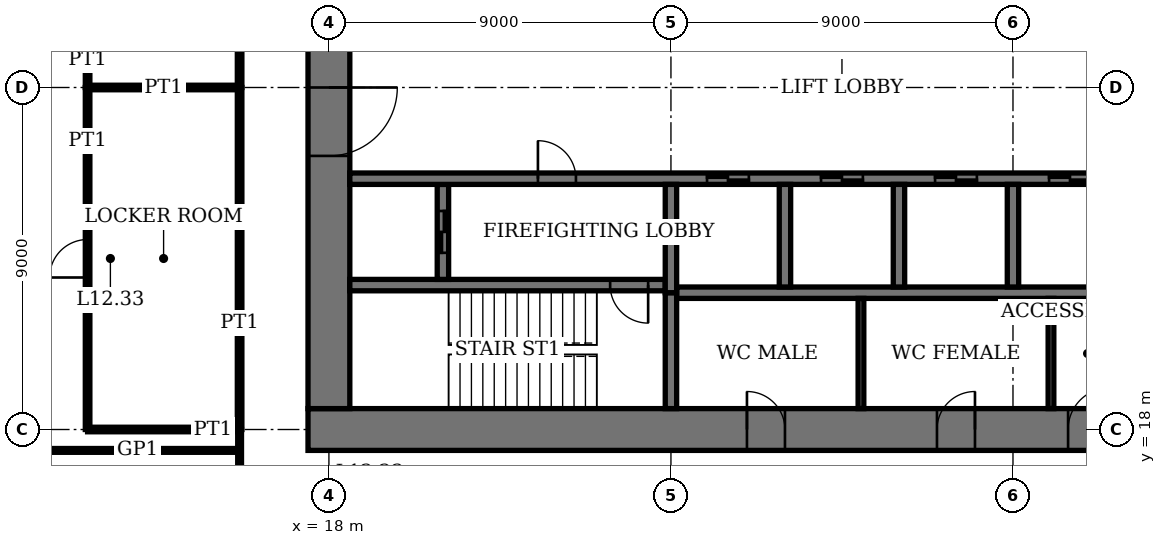
"""IFC4 building model, lengths in metres.
Left out: names, types, materials, properties, quantities, classifications, styles, units other than length and angle.
Written with IfcOpenShell. Run it as: python <this file> out.ifc"""

import sys

from ifc_helpers import new_model, si_unit, direction, frame, frame_2d, origin, place, context, subcontext, project, spatial, rectangle, extrude, element, fill, save


model = new_model("IFC4")
c1 = context("Model", 3, precision=1e-05, world=origin(), true_north=direction((0.0, 1.0)))
c2 = subcontext(c1, "Body", "Model", "MODEL_VIEW")
j1 = project(units=[si_unit("LENGTHUNIT", "METRE"), si_unit("PLANEANGLEUNIT", "RADIAN")], contexts=[c1])
p1 = place(None, origin())
s1 = spatial("IfcSite", under=j1, at=p1, CompositionType="ELEMENT")
p2 = place(p1, origin())
s2 = spatial("IfcBuilding", under=s1, at=p2, CompositionType="ELEMENT")
p3 = place(p2, frame((0.0, 0.0, 51.8)))
s3 = spatial("IfcBuildingStorey", under=s2, at=p3, CompositionType="ELEMENT", Elevation=51.8)
p4 = place(p3, frame((17.45, 18.0, 0.0), z_axis=(0.0, 0.0, 1.0), x_axis=(1.0, 0.0, 0.0)))
e1 = element("IfcWall", 1, at=p4, inside=s3, PredefinedType="SHEAR", context=c2, shape_type="SweptSolid", body=[
    extrude(rectangle(XDim=28.1, YDim=1.1, at=frame_2d((14.05, 0.0))), origin(), (0.0, 0.0, 1.0), 4.0),
])
p5 = place(p4, frame((11.55, 0.0, 0.0)))
e2 = element("IfcOpeningElement", 2, at=p5, cuts=e1, PredefinedType="OPENING", context=c2, shape_type="SweptSolid", body=[
    extrude(rectangle(XDim=1.0, YDim=2.4, at=frame_2d((0.5, 1.2))), frame((0.0, 0.56, 0.0), z_axis=(0.0, -1.0, 0.0), x_axis=(1.0, 0.0, 0.0)), (0.0, 0.0, 1.0), 1.12),
])
p6 = place(p4, frame((16.55, 0.0, 0.0)))
e3 = element("IfcOpeningElement", 3, at=p6, cuts=e1, PredefinedType="OPENING", context=c2, shape_type="SweptSolid", body=[
    extrude(rectangle(XDim=1.0, YDim=2.4, at=frame_2d((0.5, 1.2))), frame((0.0, 0.56, 0.0), z_axis=(0.0, -1.0, 0.0), x_axis=(1.0, 0.0, 0.0)), (0.0, 0.0, 1.0), 1.12),
])
p7 = place(p4, frame((20.0, 0.0, 0.0)))
e4 = element("IfcOpeningElement", 4, at=p7, cuts=e1, PredefinedType="OPENING", context=c2, shape_type="SweptSolid", body=[
    extrude(rectangle(XDim=1.1, YDim=2.4, at=frame_2d((0.55, 1.2))), frame((0.0, 0.56, 0.0), z_axis=(0.0, -1.0, 0.0), x_axis=(1.0, 0.0, 0.0)), (0.0, 0.0, 1.0), 1.12),
])
p8 = place(p4, frame((24.05, 0.0, 0.0)))
e5 = element("IfcOpeningElement", 5, at=p8, cuts=e1, PredefinedType="OPENING", context=c2, shape_type="SweptSolid", body=[
    extrude(rectangle(XDim=1.0, YDim=2.4, at=frame_2d((0.5, 1.2))), frame((0.0, 0.56, 0.0), z_axis=(0.0, -1.0, 0.0), x_axis=(1.0, 0.0, 0.0)), (0.0, 0.0, 1.0), 1.12),
])
p9 = place(p3, frame((18.0, 35.45, 0.0), z_axis=(0.0, 0.0, 1.0), x_axis=(0.0, -1.0, 0.0)))
e6 = element("IfcWall", 6, at=p9, inside=s3, PredefinedType="SHEAR", context=c2, shape_type="SweptSolid", body=[
    extrude(rectangle(XDim=16.9, YDim=1.1, at=frame_2d((8.45, 0.0))), origin(), (0.0, 0.0, 1.0), 4.0),
])
p10 = place(p9, frame((8.45, 0.0, 0.0)))
e7 = element("IfcOpeningElement", 7, at=p10, cuts=e6, PredefinedType="OPENING", context=c2, shape_type="SweptSolid", body=[
    extrude(rectangle(XDim=1.8, YDim=2.4, at=frame_2d((0.9, 1.2))), frame((0.0, 0.56, 0.0), z_axis=(0.0, -1.0, 0.0), x_axis=(1.0, 0.0, 0.0)), (0.0, 0.0, 1.0), 1.12),
])
p11 = place(p3, frame((18.55, 21.8, 0.0), z_axis=(0.0, 0.0, 1.0), x_axis=(1.0, 0.0, 0.0)))
e8 = element("IfcWall", 8, at=p11, inside=s3, PredefinedType="SHEAR", context=c2, shape_type="SweptSolid", body=[
    extrude(rectangle(XDim=8.3, YDim=0.3, at=frame_2d((4.15, 0.0))), origin(), (0.0, 0.0, 1.0), 4.0),
])
p12 = place(p11, frame((6.85, 0.0, 0.0)))
e9 = element("IfcOpeningElement", 9, at=p12, cuts=e8, PredefinedType="OPENING", context=c2, shape_type="SweptSolid", body=[
    extrude(rectangle(XDim=1.0, YDim=2.4, at=frame_2d((0.5, 1.2))), frame((0.0, 0.16, 0.0), z_axis=(0.0, -1.0, 0.0), x_axis=(1.0, 0.0, 0.0)), (0.0, 0.0, 1.0), 0.32),
])
p13 = place(p3, frame((27.0, 18.55, 0.0), z_axis=(0.0, 0.0, 1.0), x_axis=(0.0, 1.0, 0.0)))
e10 = element("IfcWall", 10, at=p13, inside=s3, PredefinedType="SHEAR", context=c2, shape_type="SweptSolid", body=[
    extrude(rectangle(XDim=3.05, YDim=0.3, at=frame_2d((1.525, 0.0))), origin(), (0.0, 0.0, 1.0), 4.0),
])
p14 = place(p3, frame((21.0, 21.95, 0.0), z_axis=(0.0, 0.0, 1.0), x_axis=(0.0, 1.0, 0.0)))
e11 = element("IfcWall", 11, at=p14, inside=s3, PredefinedType="SHEAR", context=c2, shape_type="SweptSolid", body=[
    extrude(rectangle(XDim=2.5, YDim=0.3, at=frame_2d((1.25, 0.0))), origin(), (0.0, 0.0, 1.0), 4.0),
])
p15 = place(p14, frame((0.7, 0.0, 0.0)))
e12 = element("IfcOpeningElement", 12, at=p15, cuts=e11, PredefinedType="OPENING", context=c2, shape_type="SweptSolid", body=[
    extrude(rectangle(XDim=1.1, YDim=2.4, at=frame_2d((0.55, 1.2))), frame((0.0, 0.16, 0.0), z_axis=(0.0, -1.0, 0.0), x_axis=(1.0, 0.0, 0.0)), (0.0, 0.0, 1.0), 0.32),
])
p16 = place(p3, frame((18.55, 24.6, 0.0), z_axis=(0.0, 0.0, 1.0), x_axis=(1.0, 0.0, 0.0)))
e13 = element("IfcWall", 13, at=p16, inside=s3, PredefinedType="SHEAR", context=c2, shape_type="SweptSolid", body=[
    extrude(rectangle(XDim=25.9, YDim=0.3, at=frame_2d((12.95, 0.0))), origin(), (0.0, 0.0, 1.0), 4.0),
])
p17 = place(p16, frame((4.95, 0.0, 0.0)))
e14 = element("IfcOpeningElement", 14, at=p17, cuts=e13, PredefinedType="OPENING", context=c2, shape_type="SweptSolid", body=[
    extrude(rectangle(XDim=1.0, YDim=2.4, at=frame_2d((0.5, 1.2))), frame((0.0, 0.16, 0.0), z_axis=(0.0, -1.0, 0.0), x_axis=(1.0, 0.0, 0.0)), (0.0, 0.0, 1.0), 0.32),
])
p18 = place(p16, frame((24.5, 0.0, 0.0)))
e15 = element("IfcOpeningElement", 15, at=p18, cuts=e13, PredefinedType="OPENING", context=c2, shape_type="SweptSolid", body=[
    extrude(rectangle(XDim=0.9, YDim=2.1, at=frame_2d((0.45, 1.05))), frame((0.0, 0.16, 0.0), z_axis=(0.0, -1.0, 0.0), x_axis=(1.0, 0.0, 0.0)), (0.0, 0.0, 1.0), 0.32),
])
p19 = place(p16, frame((9.4, 0.0, 0.0)))
e16 = element("IfcOpeningElement", 16, at=p19, cuts=e13, PredefinedType="OPENING", context=c2, shape_type="SweptSolid", body=[
    extrude(rectangle(XDim=1.1, YDim=2.4, at=frame_2d((0.55, 1.2))), frame((0.0, 0.16, 0.0), z_axis=(0.0, -1.0, 0.0), x_axis=(1.0, 0.0, 0.0)), (0.0, 0.0, 1.0), 0.32),
])
p20 = place(p16, frame((12.4, 0.0, 0.0)))
e17 = element("IfcOpeningElement", 17, at=p20, cuts=e13, PredefinedType="OPENING", context=c2, shape_type="SweptSolid", body=[
    extrude(rectangle(XDim=1.1, YDim=2.4, at=frame_2d((0.55, 1.2))), frame((0.0, 0.16, 0.0), z_axis=(0.0, -1.0, 0.0), x_axis=(1.0, 0.0, 0.0)), (0.0, 0.0, 1.0), 0.32),
])
p21 = place(p16, frame((15.4, 0.0, 0.0)))
e18 = element("IfcOpeningElement", 18, at=p21, cuts=e13, PredefinedType="OPENING", context=c2, shape_type="SweptSolid", body=[
    extrude(rectangle(XDim=1.1, YDim=2.4, at=frame_2d((0.55, 1.2))), frame((0.0, 0.16, 0.0), z_axis=(0.0, -1.0, 0.0), x_axis=(1.0, 0.0, 0.0)), (0.0, 0.0, 1.0), 0.32),
])
p22 = place(p16, frame((18.4, 0.0, 0.0)))
e19 = element("IfcOpeningElement", 19, at=p22, cuts=e13, PredefinedType="OPENING", context=c2, shape_type="SweptSolid", body=[
    extrude(rectangle(XDim=1.1, YDim=2.4, at=frame_2d((0.55, 1.2))), frame((0.0, 0.16, 0.0), z_axis=(0.0, -1.0, 0.0), x_axis=(1.0, 0.0, 0.0)), (0.0, 0.0, 1.0), 0.32),
])
p23 = place(p16, frame((21.3, 0.0, 0.0)))
e20 = element("IfcOpeningElement", 20, at=p23, cuts=e13, PredefinedType="OPENING", context=c2, shape_type="SweptSolid", body=[
    extrude(rectangle(XDim=1.3, YDim=2.4, at=frame_2d((0.65, 1.2))), frame((0.0, 0.16, 0.0), z_axis=(0.0, -1.0, 0.0), x_axis=(1.0, 0.0, 0.0)), (0.0, 0.0, 1.0), 0.32),
])
p24 = place(p3, frame((27.15, 21.6, 0.0), z_axis=(0.0, 0.0, 1.0), x_axis=(1.0, 0.0, 0.0)))
e21 = element("IfcWall", 21, at=p24, inside=s3, PredefinedType="SHEAR", context=c2, shape_type="SweptSolid", body=[
    extrude(rectangle(XDim=17.3, YDim=0.3, at=frame_2d((8.65, 0.0))), origin(), (0.0, 0.0, 1.0), 4.0),
])
for number, where, z_axis, x_axis in (
    (22, (30.0, 21.75, 0.0), (0.0, 0.0, 1.0), (0.0, 1.0, 0.0)),
    (23, (33.0, 21.75, 0.0), (0.0, 0.0, 1.0), (0.0, 1.0, 0.0)),
    (24, (36.0, 21.75, 0.0), (0.0, 0.0, 1.0), (0.0, 1.0, 0.0)),
):
    element("IfcWall", number, at=place(p3, frame(where, z_axis=z_axis, x_axis=x_axis)), inside=s3, PredefinedType="SHEAR", context=c2, shape_type="SweptSolid", body=[
        extrude(rectangle(XDim=2.7, YDim=0.3, at=frame_2d((1.35, 0.0))), origin(), (0.0, 0.0, 1.0), 4.0),
    ])
p25 = place(p3, frame((27.0, 21.6, 0.0), z_axis=(0.0, 0.0, 1.0), x_axis=(0.0, 1.0, 0.0)))
e25 = element("IfcWall", 25, at=p25, inside=s3, PredefinedType="SHEAR", context=c2, shape_type="SweptSolid", body=[
    extrude(rectangle(XDim=2.85, YDim=0.3, at=frame_2d((1.425, 0.0))), origin(), (0.0, 0.0, 1.0), 4.0),
])
p26 = place(p3, frame((10.075, 17.45, 0.0), z_axis=(0.0, 0.0, 1.0), x_axis=(1.0, 0.0, 0.0)))
e26 = element("IfcWall", 26, at=p26, inside=s3, PredefinedType="PARTITIONING", context=c2, shape_type="SweptSolid", body=[
    extrude(rectangle(XDim=5.575, YDim=0.1, at=frame_2d((2.788, 0.0))), origin(), (0.0, 0.0, 1.0), 3.75),
])
for number, where, z_axis, x_axis in (
    (27, (11.65, 18.0, 0.0), (0.0, 0.0, 1.0), (1.0, 0.0, 0.0)),
    (28, (11.65, 27.0, 0.0), (0.0, 0.0, 1.0), (1.0, 0.0, 0.0)),
):
    element("IfcWall", number, at=place(p3, frame(where, z_axis=z_axis, x_axis=x_axis)), inside=s3, PredefinedType="PARTITIONING", context=c2, shape_type="SweptSolid", body=[
        extrude(rectangle(XDim=4.0, YDim=0.12, at=frame_2d((2.0, 0.0))), origin(), (0.0, 0.0, 1.0), 3.05),
    ])
p27 = place(p3, frame((11.65, 18.0, 0.0), z_axis=(0.0, 0.0, 1.0), x_axis=(0.0, 1.0, 0.0)))
e29 = element("IfcWall", 29, at=p27, inside=s3, PredefinedType="PARTITIONING", context=c2, shape_type="SweptSolid", body=[
    extrude(rectangle(XDim=9.0, YDim=0.12, at=frame_2d((4.5, 0.0))), origin(), (0.0, 0.0, 1.0), 3.75),
])
p28 = place(p27, frame((4.0, 0.0, 0.0)))
e30 = element("IfcOpeningElement", 30, at=p28, cuts=e29, PredefinedType="OPENING", context=c2, shape_type="SweptSolid", body=[
    extrude(rectangle(XDim=1.0, YDim=2.4, at=frame_2d((0.5, 1.2))), frame((0.0, 0.07, 0.0), z_axis=(0.0, -1.0, 0.0), x_axis=(1.0, 0.0, 0.0)), (0.0, 0.0, 1.0), 0.14),
])
p29 = place(p3, frame((11.65, 27.0, 0.0), z_axis=(0.0, 0.0, 1.0), x_axis=(0.0, 1.0, 0.0)))
e31 = element("IfcWall", 31, at=p29, inside=s3, PredefinedType="PARTITIONING", context=c2, shape_type="SweptSolid", body=[
    extrude(rectangle(XDim=4.5, YDim=0.12, at=frame_2d((2.25, 0.0))), origin(), (0.0, 0.0, 1.0), 3.75),
])
p30 = place(p29, frame((1.75, 0.0, 0.0)))
e32 = element("IfcOpeningElement", 32, at=p30, cuts=e31, PredefinedType="OPENING", context=c2, shape_type="SweptSolid", body=[
    extrude(rectangle(XDim=1.0, YDim=2.4, at=frame_2d((0.5, 1.2))), frame((0.0, 0.07, 0.0), z_axis=(0.0, -1.0, 0.0), x_axis=(1.0, 0.0, 0.0)), (0.0, 0.0, 1.0), 0.14),
])
p31 = place(p3, frame((15.65, 18.0, 0.0), z_axis=(0.0, 0.0, 1.0), x_axis=(0.0, 1.0, 0.0)))
e33 = element("IfcWall", 33, at=p31, inside=s3, PredefinedType="PARTITIONING", context=c2, shape_type="SweptSolid", body=[
    extrude(rectangle(XDim=9.0, YDim=0.12, at=frame_2d((4.5, 0.0))), origin(), (0.0, 0.0, 1.0), 3.75),
])
p32 = place(p3, frame((15.65, 27.0, 0.0), z_axis=(0.0, 0.0, 1.0), x_axis=(0.0, 1.0, 0.0)))
e34 = element("IfcWall", 34, at=p32, inside=s3, PredefinedType="PARTITIONING", context=c2, shape_type="SweptSolid", body=[
    extrude(rectangle(XDim=4.5, YDim=0.12, at=frame_2d((2.25, 0.0))), origin(), (0.0, 0.0, 1.0), 3.75),
])
p33 = place(p3, frame((15.65, 15.65, 0.0), z_axis=(0.0, 0.0, 1.0), x_axis=(0.0, 1.0, 0.0)))
e35 = element("IfcWall", 35, at=p33, inside=s3, PredefinedType="PARTITIONING", context=c2, shape_type="SweptSolid", body=[
    extrude(rectangle(XDim=2.35, YDim=0.1, at=frame_2d((1.175, 0.0))), origin(), (0.0, 0.0, 1.0), 3.75),
])
for number, where, z_axis, x_axis in (
    (36, (32.0, 18.55, 0.0), (0.0, 0.0, 1.0), (0.0, 1.0, 0.0)),
    (37, (37.0, 18.55, 0.0), (0.0, 0.0, 1.0), (0.0, 1.0, 0.0)),
):
    element("IfcWall", number, at=place(p3, frame(where, z_axis=z_axis, x_axis=x_axis)), inside=s3, PredefinedType="PARTITIONING", context=c2, shape_type="SweptSolid", body=[
        extrude(rectangle(XDim=2.9, YDim=0.15, at=frame_2d((1.45, 0.0))), origin(), (0.0, 0.0, 1.0), 3.75),
    ])
p34 = place(p10, origin())
e38 = element("IfcDoor", 38, at=p34, inside=s3, OperationType="DOUBLE_DOOR_DOUBLE_SWING", PredefinedType="DOOR", context=c2, shape_type="SweptSolid", body=[
    extrude(rectangle(XDim=1.8, YDim=2.4, at=frame_2d((0.9, 1.2))), frame((0.0, 0.03, 0.0), z_axis=(0.0, -1.0, 0.0), x_axis=(1.0, 0.0, 0.0)), (0.0, 0.0, 1.0), 0.06),
    extrude(rectangle(XDim=0.04, YDim=2.4, at=frame_2d((0.02, 1.2))), frame((0.0, 0.55, 0.0), z_axis=(0.0, -1.0, 0.0), x_axis=(1.0, 0.0, 0.0)), (0.0, 0.0, 1.0), 1.1),
    extrude(rectangle(XDim=0.04, YDim=2.4, at=frame_2d((1.78, 1.2))), frame((0.0, 0.55, 0.0), z_axis=(0.0, -1.0, 0.0), x_axis=(1.0, 0.0, 0.0)), (0.0, 0.0, 1.0), 1.1),
    extrude(rectangle(XDim=1.8, YDim=0.04, at=frame_2d((0.9, 2.38))), frame((0.0, 0.55, 0.0), z_axis=(0.0, -1.0, 0.0), x_axis=(1.0, 0.0, 0.0)), (0.0, 0.0, 1.0), 1.1),
])
fill(e7, e38)
p35 = place(p5, origin())
e39 = element("IfcDoor", 39, at=p35, inside=s3, OperationType="SINGLE_SWING_RIGHT", PredefinedType="DOOR", context=c2, shape_type="SweptSolid", body=[
    extrude(rectangle(XDim=1.0, YDim=2.4, at=frame_2d((0.5, 1.2))), frame((0.0, 0.025, 0.0), z_axis=(0.0, -1.0, 0.0), x_axis=(1.0, 0.0, 0.0)), (0.0, 0.0, 1.0), 0.05),
    extrude(rectangle(XDim=0.04, YDim=2.4, at=frame_2d((0.02, 1.2))), frame((0.0, 0.4, 0.0), z_axis=(0.0, -1.0, 0.0), x_axis=(1.0, 0.0, 0.0)), (0.0, 0.0, 1.0), 0.8),
    extrude(rectangle(XDim=0.04, YDim=2.4, at=frame_2d((0.98, 1.2))), frame((0.0, 0.4, 0.0), z_axis=(0.0, -1.0, 0.0), x_axis=(1.0, 0.0, 0.0)), (0.0, 0.0, 1.0), 0.8),
    extrude(rectangle(XDim=1.0, YDim=0.04, at=frame_2d((0.5, 2.38))), frame((0.0, 0.4, 0.0), z_axis=(0.0, -1.0, 0.0), x_axis=(1.0, 0.0, 0.0)), (0.0, 0.0, 1.0), 0.8),
])
fill(e2, e39)
p36 = place(p6, origin())
e40 = element("IfcDoor", 40, at=p36, inside=s3, OperationType="SINGLE_SWING_LEFT", PredefinedType="DOOR", context=c2, shape_type="SweptSolid", body=[
    extrude(rectangle(XDim=1.0, YDim=2.4, at=frame_2d((0.5, 1.2))), frame((0.0, 0.025, 0.0), z_axis=(0.0, -1.0, 0.0), x_axis=(1.0, 0.0, 0.0)), (0.0, 0.0, 1.0), 0.05),
    extrude(rectangle(XDim=0.04, YDim=2.4, at=frame_2d((0.02, 1.2))), frame((0.0, 0.4, 0.0), z_axis=(0.0, -1.0, 0.0), x_axis=(1.0, 0.0, 0.0)), (0.0, 0.0, 1.0), 0.8),
    extrude(rectangle(XDim=0.04, YDim=2.4, at=frame_2d((0.98, 1.2))), frame((0.0, 0.4, 0.0), z_axis=(0.0, -1.0, 0.0), x_axis=(1.0, 0.0, 0.0)), (0.0, 0.0, 1.0), 0.8),
    extrude(rectangle(XDim=1.0, YDim=0.04, at=frame_2d((0.5, 2.38))), frame((0.0, 0.4, 0.0), z_axis=(0.0, -1.0, 0.0), x_axis=(1.0, 0.0, 0.0)), (0.0, 0.0, 1.0), 0.8),
])
fill(e3, e40)
p37 = place(p7, origin())
e41 = element("IfcDoor", 41, at=p37, inside=s3, OperationType="SINGLE_SWING_LEFT", PredefinedType="DOOR", context=c2, shape_type="SweptSolid", body=[
    extrude(rectangle(XDim=1.1, YDim=2.4, at=frame_2d((0.55, 1.2))), frame((0.0, 0.025, 0.0), z_axis=(0.0, -1.0, 0.0), x_axis=(1.0, 0.0, 0.0)), (0.0, 0.0, 1.0), 0.05),
    extrude(rectangle(XDim=0.04, YDim=2.4, at=frame_2d((0.02, 1.2))), frame((0.0, 0.44, 0.0), z_axis=(0.0, -1.0, 0.0), x_axis=(1.0, 0.0, 0.0)), (0.0, 0.0, 1.0), 0.88),
    extrude(rectangle(XDim=0.04, YDim=2.4, at=frame_2d((1.08, 1.2))), frame((0.0, 0.44, 0.0), z_axis=(0.0, -1.0, 0.0), x_axis=(1.0, 0.0, 0.0)), (0.0, 0.0, 1.0), 0.88),
    extrude(rectangle(XDim=1.1, YDim=0.04, at=frame_2d((0.55, 2.38))), frame((0.0, 0.44, 0.0), z_axis=(0.0, -1.0, 0.0), x_axis=(1.0, 0.0, 0.0)), (0.0, 0.0, 1.0), 0.88),
])
fill(e4, e41)
p38 = place(p12, origin())
e42 = element("IfcDoor", 42, at=p38, inside=s3, OperationType="SINGLE_SWING_RIGHT", PredefinedType="DOOR", context=c2, shape_type="SweptSolid", body=[
    extrude(rectangle(XDim=1.0, YDim=2.4, at=frame_2d((0.5, 1.2))), frame((0.0, 0.03, 0.0), z_axis=(0.0, -1.0, 0.0), x_axis=(1.0, 0.0, 0.0)), (0.0, 0.0, 1.0), 0.06),
])
fill(e9, e42)
p39 = place(p17, origin())
e43 = element("IfcDoor", 43, at=p39, inside=s3, OperationType="SINGLE_SWING_RIGHT", PredefinedType="DOOR", context=c2, shape_type="SweptSolid", body=[
    extrude(rectangle(XDim=1.0, YDim=2.4, at=frame_2d((0.5, 1.2))), frame((0.0, 0.03, 0.0), z_axis=(0.0, -1.0, 0.0), x_axis=(1.0, 0.0, 0.0)), (0.0, 0.0, 1.0), 0.06),
])
fill(e14, e43)
p40 = place(p28, origin())
e44 = element("IfcDoor", 44, at=p40, inside=s3, OperationType="SINGLE_SWING_RIGHT", PredefinedType="DOOR", context=c2, shape_type="SweptSolid", body=[
    extrude(rectangle(XDim=1.0, YDim=2.4, at=frame_2d((0.5, 1.2))), frame((0.0, 0.025, 0.0), z_axis=(0.0, -1.0, 0.0), x_axis=(1.0, 0.0, 0.0)), (0.0, 0.0, 1.0), 0.05),
])
fill(e30, e44)
p41 = place(p19, origin())
e45 = element("IfcDoor", 45, at=p41, inside=s3, OperationType="DOUBLE_DOOR_SLIDING", PredefinedType="DOOR", context=c2, shape_type="SweptSolid", body=[
    extrude(rectangle(XDim=1.1, YDim=2.4, at=frame_2d((0.55, 1.2))), frame((0.0, 0.02, 0.0), z_axis=(0.0, -1.0, 0.0), x_axis=(1.0, 0.0, 0.0)), (0.0, 0.0, 1.0), 0.04),
])
fill(e16, e45)
p42 = place(p20, origin())
e46 = element("IfcDoor", 46, at=p42, inside=s3, OperationType="DOUBLE_DOOR_SLIDING", PredefinedType="DOOR", context=c2, shape_type="SweptSolid", body=[
    extrude(rectangle(XDim=1.1, YDim=2.4, at=frame_2d((0.55, 1.2))), frame((0.0, 0.02, 0.0), z_axis=(0.0, -1.0, 0.0), x_axis=(1.0, 0.0, 0.0)), (0.0, 0.0, 1.0), 0.04),
])
fill(e17, e46)
p43 = place(p21, origin())
e47 = element("IfcDoor", 47, at=p43, inside=s3, OperationType="DOUBLE_DOOR_SLIDING", PredefinedType="DOOR", context=c2, shape_type="SweptSolid", body=[
    extrude(rectangle(XDim=1.1, YDim=2.4, at=frame_2d((0.55, 1.2))), frame((0.0, 0.02, 0.0), z_axis=(0.0, -1.0, 0.0), x_axis=(1.0, 0.0, 0.0)), (0.0, 0.0, 1.0), 0.04),
])
fill(e18, e47)
p44 = place(p22, origin())
e48 = element("IfcDoor", 48, at=p44, inside=s3, OperationType="DOUBLE_DOOR_SLIDING", PredefinedType="DOOR", context=c2, shape_type="SweptSolid", body=[
    extrude(rectangle(XDim=1.1, YDim=2.4, at=frame_2d((0.55, 1.2))), frame((0.0, 0.02, 0.0), z_axis=(0.0, -1.0, 0.0), x_axis=(1.0, 0.0, 0.0)), (0.0, 0.0, 1.0), 0.04),
])
fill(e19, e48)
p45 = place(p15, origin())
e49 = element("IfcDoor", 49, at=p45, inside=s3, OperationType="DOUBLE_DOOR_SLIDING", PredefinedType="DOOR", context=c2, shape_type="SweptSolid", body=[
    extrude(rectangle(XDim=1.1, YDim=2.4, at=frame_2d((0.55, 1.2))), frame((0.0, 0.03, 0.0), z_axis=(0.0, -1.0, 0.0), x_axis=(1.0, 0.0, 0.0)), (0.0, 0.0, 1.0), 0.06),
])
fill(e12, e49)
save(model, sys.argv[1])
